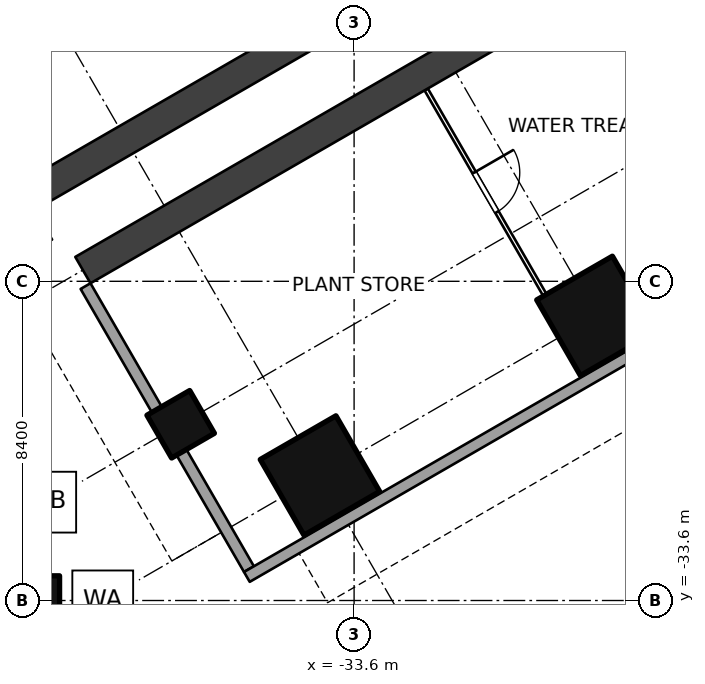
"""IFC4 building model, lengths in metres.
Left out: names, types, materials, properties, quantities, classifications, styles, units other than length and angle.
Written with IfcOpenShell. Run it as: python <this file> out.ifc"""

import sys

from ifc_helpers import new_model, si_unit, direction, frame, frame_2d, origin, origin_2d, place, context, subcontext, project, spatial, rectangle, extrude, element, fill, save


model = new_model("IFC4")
c1 = context("Model", 3, precision=1e-05, world=origin(), true_north=direction((0.0, 1.0)))
c2 = subcontext(c1, "Body", "Model", "MODEL_VIEW")
j1 = project(units=[si_unit("LENGTHUNIT", "METRE"), si_unit("PLANEANGLEUNIT", "RADIAN")], contexts=[c1])
p1 = place(None, origin())
s1 = spatial("IfcSite", under=j1, at=p1, CompositionType="ELEMENT")
p2 = place(p1, origin())
s2 = spatial("IfcBuilding", under=s1, at=p2, CompositionType="ELEMENT")
p3 = place(p2, frame((0.0, 0.0, -10.5)))
s3 = spatial("IfcBuildingStorey", under=s2, at=p3, CompositionType="ELEMENT", Elevation=-10.5)
for number, where, z_axis, x_axis in (
    (1, (-27.224, -26.11, 0.0), (0.0, 0.0, 1.0), (-0.5, 0.866, 0.0)),
    (2, (-34.499, -30.31, 0.0), (0.0, 0.0, 1.0), (-0.5, 0.866, 0.0)),
):
    element("IfcColumn", number, at=place(p3, frame(where, z_axis=z_axis, x_axis=x_axis)), inside=s3, PredefinedType="COLUMN", context=c2, shape_type="SweptSolid", body=[
        extrude(rectangle(XDim=2.3, YDim=2.3, at=origin_2d()), origin(), (0.0, 0.0, 1.0), 3.5),
    ])
for number, where, z_axis, x_axis in (
    (3, (-38.164, -28.962, 0.0), (0.0, 0.0, 1.0), (-0.5, 0.866, 0.0)),
    (4, (-42.0, -33.6, 0.0), (0.0, 0.0, 1.0), (1.0, 0.0, 0.0)),
):
    element("IfcColumn", number, at=place(p3, frame(where, z_axis=z_axis, x_axis=x_axis)), inside=s3, PredefinedType="COLUMN", context=c2, shape_type="SweptSolid", body=[
        extrude(rectangle(XDim=1.3, YDim=1.3, at=origin_2d()), origin(), (0.0, 0.0, 1.0), 3.5),
    ])
p4 = place(p3, frame((-8.91, -6.53, 0.0), z_axis=(0.0, 0.0, 1.0), x_axis=(-0.866025284237, -0.500000207062, 0.0)))
e5 = element("IfcWall", 5, at=p4, inside=s3, PredefinedType="SHEAR", context=c2, shape_type="SweptSolid", body=[
    extrude(rectangle(XDim=36.75, YDim=0.8, at=frame_2d((18.375, 0.0))), origin(), (0.0, 0.0, 1.0), 3.5),
])
p5 = place(p4, frame((1.35, 0.0, 0.0)))
e6 = element("IfcOpeningElement", 6, at=p5, cuts=e5, PredefinedType="OPENING", context=c2, shape_type="SweptSolid", body=[
    extrude(rectangle(XDim=1.2, YDim=2.1, at=frame_2d((0.6, 1.05))), frame((0.0, 0.41, 0.0), z_axis=(0.0, -1.0, 0.0), x_axis=(1.0, 0.0, 0.0)), (0.0, 0.0, 1.0), 0.82),
])
p6 = place(p3, frame((-10.11, -4.451, 0.0), z_axis=(0.0, 0.0, 1.0), x_axis=(-0.866025284237, -0.500000207062, 0.0)))
e7 = element("IfcWall", 7, at=p6, inside=s3, PredefinedType="SHEAR", context=c2, shape_type="SweptSolid", body=[
    extrude(rectangle(XDim=36.75, YDim=0.8, at=frame_2d((18.375, 0.0))), origin(), (0.0, 0.0, 1.0), 3.5),
])
p7 = place(p6, frame((1.35, 0.0, 0.0)))
e8 = element("IfcOpeningElement", 8, at=p7, cuts=e7, PredefinedType="OPENING", context=c2, shape_type="SweptSolid", body=[
    extrude(rectangle(XDim=1.2, YDim=2.1, at=frame_2d((0.6, 1.05))), frame((0.0, 0.41, 0.0), z_axis=(0.0, -1.0, 0.0), x_axis=(1.0, 0.0, 0.0)), (0.0, 0.0, 1.0), 0.82),
])
p8 = place(p3, frame((-31.703, -20.151, 0.0), z_axis=(0.0, 0.0, 1.0), x_axis=(0.500007509209, -0.866021068297, 0.0)))
e9 = element("IfcWall", 9, at=p8, inside=s3, PredefinedType="PARTITIONING", context=c2, shape_type="SweptSolid", body=[
    extrude(rectangle(XDim=8.6, YDim=0.1, at=frame_2d((4.3, 0.0))), origin(), (0.0, 0.0, 1.0), 3.2),
])
p9 = place(p8, frame((2.525, 0.0, 0.0)))
e10 = element("IfcOpeningElement", 10, at=p9, cuts=e9, PredefinedType="OPENING", context=c2, shape_type="SweptSolid", body=[
    extrude(rectangle(XDim=1.2, YDim=2.1, at=frame_2d((0.6, 1.05))), frame((0.0, 0.06, 0.0), z_axis=(0.0, -1.0, 0.0), x_axis=(1.0, 0.0, 0.0)), (0.0, 0.0, 1.0), 0.12),
])
p10 = place(p3, frame((-40.667, -25.326, 0.0), z_axis=(0.0, 0.0, 1.0), x_axis=(0.500007509209, -0.866021068297, 0.0)))
e11 = element("IfcWall", 11, at=p10, inside=s3, PredefinedType="SOLIDWALL", context=c2, shape_type="SweptSolid", body=[
    extrude(rectangle(XDim=8.6, YDim=0.3, at=frame_2d((4.3, 0.0))), origin(), (0.0, 0.0, 1.0), 1.9),
])
p11 = place(p3, frame((-0.15, -12.038, 0.0), z_axis=(0.0, 0.0, 1.0), x_axis=(-0.866026292622, -0.499998460486, 0.0)))
e12 = element("IfcWall", 12, at=p11, inside=s3, PredefinedType="SOLIDWALL", context=c2, shape_type="SweptSolid", body=[
    extrude(rectangle(XDim=41.883, YDim=0.3, at=frame_2d((20.941, 0.0))), origin(), (0.0, 0.0, 1.0), 3.2),
])
p12 = place(p11, frame((25.383, 0.0, 0.0)))
e13 = element("IfcOpeningElement", 13, at=p12, cuts=e12, PredefinedType="OPENING", context=c2, shape_type="SweptSolid", body=[
    extrude(rectangle(XDim=1.8, YDim=2.4, at=frame_2d((0.9, 1.2))), frame((0.0, 0.16, 0.0), z_axis=(0.0, -1.0, 0.0), x_axis=(1.0, 0.0, 0.0)), (0.0, 0.0, 1.0), 0.32),
])
p13 = place(p9, origin())
e14 = element("IfcDoor", 14, at=p13, inside=s3, OperationType="DOUBLE_SWING_LEFT", PredefinedType="DOOR", context=c2, shape_type="SweptSolid", body=[
    extrude(rectangle(XDim=1.2, YDim=2.1, at=frame_2d((0.6, 1.05))), frame((0.0, 0.025, 0.0), z_axis=(0.0, -1.0, 0.0), x_axis=(1.0, 0.0, 0.0)), (0.0, 0.0, 1.0), 0.05),
])
fill(e10, e14)
save(model, sys.argv[1])
